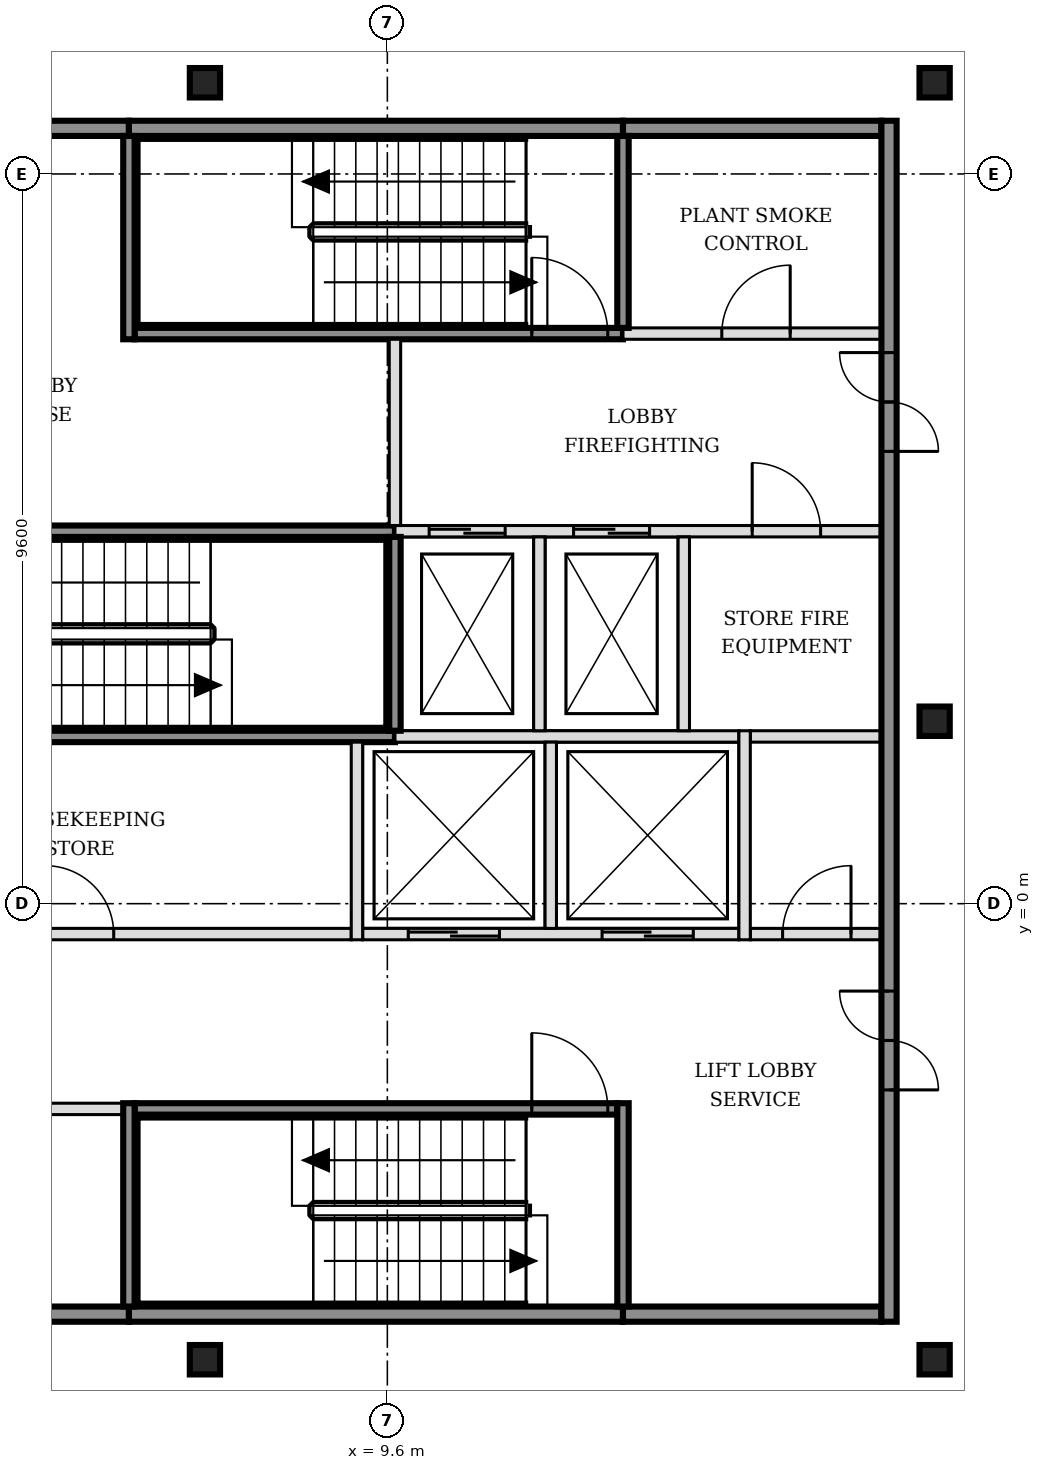
"""IFC4 building model, lengths in metres.
Left out: names, types, materials, properties, quantities, classifications, styles, units other than length and angle.
Written with IfcOpenShell. Run it as: python <this file> out.ifc"""

import sys

from ifc_helpers import new_model, si_unit, direction, frame, frame_2d, origin, origin_2d, place, context, subcontext, project, spatial, rectangle, i_section, extrude, element, fill, save


model = new_model("IFC4")
c1 = context("Model", 3, precision=1e-05, world=origin(), true_north=direction((0.0, 1.0)))
c2 = subcontext(c1, "Body", "Model", "MODEL_VIEW")
j1 = project(units=[si_unit("LENGTHUNIT", "METRE"), si_unit("PLANEANGLEUNIT", "RADIAN")], contexts=[c1])
p1 = place(None, origin())
s1 = spatial("IfcSite", under=j1, at=p1, CompositionType="ELEMENT")
p2 = place(p1, origin())
s2 = spatial("IfcBuilding", under=s1, at=p2, CompositionType="ELEMENT")
p3 = place(p2, frame((0.0, 0.0, 288.6)))
s3 = spatial("IfcBuildingStorey", under=s2, at=p3, CompositionType="ELEMENT", Elevation=288.6)
for number, where, z_axis, x_axis in (
    (1, (7.2, -6.0, -0.15), (0.0, 0.0, 1.0), (1.0, 0.0, 0.0)),
    (2, (16.8, -6.0, -0.15), (0.0, 0.0, 1.0), (1.0, 0.0, 0.0)),
    (3, (16.8, 2.4, -0.15), (0.0, 0.0, 1.0), (1.0, 0.0, 0.0)),
    (4, (7.2, 10.8, -0.15), (0.0, 0.0, 1.0), (1.0, 0.0, 0.0)),
    (5, (16.8, 10.8, -0.15), (0.0, 0.0, 1.0), (1.0, 0.0, 0.0)),
):
    element("IfcColumn", number, at=place(p3, frame(where, z_axis=z_axis, x_axis=x_axis)), inside=s3, PredefinedType="COLUMN", context=c2, shape_type="SweptSolid", body=[
        extrude(i_section(OverallWidth=0.398, OverallDepth=0.387, WebThickness=0.021, FlangeThickness=0.033, FilletRadius=0.015, at=origin_2d()), origin(), (0.0, 0.0, 1.0), 3.6),
    ])
p4 = place(p3, frame((-1.7, -5.4, 0.0), z_axis=(0.0, 0.0, 1.0), x_axis=(1.0, 0.0, 0.0)))
e6 = element("IfcWall", 6, at=p4, inside=s3, PredefinedType="SOLIDWALL", context=c2, shape_type="SweptSolid", body=[
    extrude(rectangle(XDim=7.9, YDim=0.2, at=frame_2d((3.95, 0.0))), origin(), (0.0, 0.0, 1.0), 3.45),
])
p5 = place(p3, frame((6.2, -5.4, 0.0), z_axis=(0.0, 0.0, 1.0), x_axis=(1.0, 0.0, 0.0)))
e7 = element("IfcWall", 7, at=p5, inside=s3, PredefinedType="SOLIDWALL", context=c2, shape_type="SweptSolid", body=[
    extrude(rectangle(XDim=6.5, YDim=0.2, at=frame_2d((3.25, 0.0))), origin(), (0.0, 0.0, 1.0), 3.45),
])
p6 = place(p3, frame((12.7, -5.4, 0.0), z_axis=(0.0, 0.0, 1.0), x_axis=(1.0, 0.0, 0.0)))
e8 = element("IfcWall", 8, at=p6, inside=s3, PredefinedType="SOLIDWALL", context=c2, shape_type="SweptSolid", body=[
    extrude(rectangle(XDim=3.4, YDim=0.2, at=frame_2d((1.7, 0.0))), origin(), (0.0, 0.0, 1.0), 3.45),
])
p7 = place(p3, frame((-1.7, -2.7, 0.0), z_axis=(0.0, 0.0, 1.0), x_axis=(1.0, 0.0, 0.0)))
e9 = element("IfcWall", 9, at=p7, inside=s3, PredefinedType="PARTITIONING", context=c2, shape_type="SweptSolid", body=[
    extrude(rectangle(XDim=7.825, YDim=0.15, at=frame_2d((3.913, 0.0))), origin(), (0.0, 0.0, 1.0), 3.45),
])
p8 = place(p7, frame((3.45, 0.0, 0.0)))
e10 = element("IfcOpeningElement", 10, at=p8, cuts=e9, PredefinedType="OPENING", context=c2, shape_type="SweptSolid", body=[
    extrude(rectangle(XDim=0.9, YDim=2.1, at=frame_2d((0.45, 1.05))), frame((0.0, 0.085, 0.0), z_axis=(0.0, -1.0, 0.0), x_axis=(1.0, 0.0, 0.0)), (0.0, 0.0, 1.0), 0.17),
])
p9 = place(p3, frame((6.275, -2.7, 0.0), z_axis=(0.0, 0.0, 1.0), x_axis=(1.0, 0.0, 0.0)))
e11 = element("IfcWall", 11, at=p9, inside=s3, PredefinedType="SOLIDWALL", context=c2, shape_type="SweptSolid", body=[
    extrude(rectangle(XDim=6.35, YDim=0.15, at=frame_2d((3.175, 0.0))), origin(), (0.0, 0.0, 1.0), 3.45),
])
p10 = place(p9, frame((5.225, 0.0, 0.0)))
e12 = element("IfcOpeningElement", 12, at=p10, cuts=e11, PredefinedType="OPENING", context=c2, shape_type="SweptSolid", body=[
    extrude(rectangle(XDim=1.0, YDim=2.1, at=frame_2d((0.5, 1.05))), frame((0.0, 0.085, 0.0), z_axis=(0.0, -1.0, 0.0), x_axis=(1.0, 0.0, 0.0)), (0.0, 0.0, 1.0), 0.17),
])
p11 = place(p3, frame((-1.7, -0.4, 0.0), z_axis=(0.0, 0.0, 1.0), x_axis=(1.0, 0.0, 0.0)))
e13 = element("IfcWall", 13, at=p11, inside=s3, PredefinedType="PARTITIONING", context=c2, shape_type="SweptSolid", body=[
    extrude(rectangle(XDim=10.825, YDim=0.15, at=frame_2d((5.413, 0.0))), origin(), (0.0, 0.0, 1.0), 3.45),
])
p12 = place(p11, frame((1.3, 0.0, 0.0)))
e14 = element("IfcOpeningElement", 14, at=p12, cuts=e13, PredefinedType="OPENING", context=c2, shape_type="SweptSolid", body=[
    extrude(rectangle(XDim=0.9, YDim=2.1, at=frame_2d((0.45, 1.05))), frame((0.0, 0.085, 0.0), z_axis=(0.0, -1.0, 0.0), x_axis=(1.0, 0.0, 0.0)), (0.0, 0.0, 1.0), 0.17),
])
p13 = place(p11, frame((6.8, 0.0, 0.0)))
e15 = element("IfcOpeningElement", 15, at=p13, cuts=e13, PredefinedType="OPENING", context=c2, shape_type="SweptSolid", body=[
    extrude(rectangle(XDim=0.9, YDim=2.1, at=frame_2d((0.45, 1.05))), frame((0.0, 0.085, 0.0), z_axis=(0.0, -1.0, 0.0), x_axis=(1.0, 0.0, 0.0)), (0.0, 0.0, 1.0), 0.17),
])
p14 = place(p3, frame((9.275, -0.4, 0.0), z_axis=(0.0, 0.0, 1.0), x_axis=(1.0, 0.0, 0.0)))
e16 = element("IfcWall", 16, at=p14, inside=s3, PredefinedType="SOLIDWALL", context=c2, shape_type="SweptSolid", body=[
    extrude(rectangle(XDim=4.95, YDim=0.15, at=frame_2d((2.475, 0.0))), origin(), (0.0, 0.0, 1.0), 3.45),
])
p15 = place(p14, frame((0.6, 0.0, 0.0)))
e17 = element("IfcOpeningElement", 17, at=p15, cuts=e16, PredefinedType="OPENING", context=c2, shape_type="SweptSolid", body=[
    extrude(rectangle(XDim=1.2, YDim=2.1, at=frame_2d((0.6, 1.05))), frame((0.0, 0.085, 0.0), z_axis=(0.0, -1.0, 0.0), x_axis=(1.0, 0.0, 0.0)), (0.0, 0.0, 1.0), 0.17),
])
p16 = place(p14, frame((3.15, 0.0, 0.0)))
e18 = element("IfcOpeningElement", 18, at=p16, cuts=e16, PredefinedType="OPENING", context=c2, shape_type="SweptSolid", body=[
    extrude(rectangle(XDim=1.2, YDim=2.1, at=frame_2d((0.6, 1.05))), frame((0.0, 0.085, 0.0), z_axis=(0.0, -1.0, 0.0), x_axis=(1.0, 0.0, 0.0)), (0.0, 0.0, 1.0), 0.17),
])
p17 = place(p3, frame((14.375, -0.4, 0.0), z_axis=(0.0, 0.0, 1.0), x_axis=(1.0, 0.0, 0.0)))
e19 = element("IfcWall", 19, at=p17, inside=s3, PredefinedType="PARTITIONING", context=c2, shape_type="SweptSolid", body=[
    extrude(rectangle(XDim=1.725, YDim=0.15, at=frame_2d((0.863, 0.0))), origin(), (0.0, 0.0, 1.0), 3.45),
])
p18 = place(p17, frame((0.425, 0.0, 0.0)))
e20 = element("IfcOpeningElement", 20, at=p18, cuts=e19, PredefinedType="OPENING", context=c2, shape_type="SweptSolid", body=[
    extrude(rectangle(XDim=0.9, YDim=2.1, at=frame_2d((0.45, 1.05))), frame((0.0, 0.085, 0.0), z_axis=(0.0, -1.0, 0.0), x_axis=(1.0, 0.0, 0.0)), (0.0, 0.0, 1.0), 0.17),
])
p19 = place(p3, frame((3.2, 2.2, 0.0), z_axis=(0.0, 0.0, 1.0), x_axis=(1.0, 0.0, 0.0)))
e21 = element("IfcWall", 21, at=p19, inside=s3, PredefinedType="SOLIDWALL", context=c2, shape_type="SweptSolid", body=[
    extrude(rectangle(XDim=6.5, YDim=0.15, at=frame_2d((3.25, 0.0))), origin(), (0.0, 0.0, 1.0), 3.45),
])
p20 = place(p3, frame((9.7, 2.2, 0.0), z_axis=(0.0, 0.0, 1.0), x_axis=(1.0, 0.0, 0.0)))
e22 = element("IfcWall", 22, at=p20, inside=s3, PredefinedType="SOLIDWALL", context=c2, shape_type="SweptSolid", body=[
    extrude(rectangle(XDim=4.525, YDim=0.15, at=frame_2d((2.263, 0.0))), origin(), (0.0, 0.0, 1.0), 3.45),
])
p21 = place(p3, frame((14.375, 2.2, 0.0), z_axis=(0.0, 0.0, 1.0), x_axis=(1.0, 0.0, 0.0)))
e23 = element("IfcWall", 23, at=p21, inside=s3, PredefinedType="PARTITIONING", context=c2, shape_type="SweptSolid", body=[
    extrude(rectangle(XDim=1.725, YDim=0.15, at=frame_2d((0.863, 0.0))), origin(), (0.0, 0.0, 1.0), 3.45),
])
p22 = place(p3, frame((3.2, 4.9, 0.0), z_axis=(0.0, 0.0, 1.0), x_axis=(1.0, 0.0, 0.0)))
e24 = element("IfcWall", 24, at=p22, inside=s3, PredefinedType="SOLIDWALL", context=c2, shape_type="SweptSolid", body=[
    extrude(rectangle(XDim=6.5, YDim=0.15, at=frame_2d((3.25, 0.0))), origin(), (0.0, 0.0, 1.0), 3.45),
])
p23 = place(p22, frame((0.175, 0.0, 0.0)))
e25 = element("IfcOpeningElement", 25, at=p23, cuts=e24, PredefinedType="OPENING", context=c2, shape_type="SweptSolid", body=[
    extrude(rectangle(XDim=1.0, YDim=2.1, at=frame_2d((0.5, 1.05))), frame((0.0, 0.085, 0.0), z_axis=(0.0, -1.0, 0.0), x_axis=(1.0, 0.0, 0.0)), (0.0, 0.0, 1.0), 0.17),
])
p24 = place(p3, frame((9.7, 4.9, 0.0), z_axis=(0.0, 0.0, 1.0), x_axis=(1.0, 0.0, 0.0)))
e26 = element("IfcWall", 26, at=p24, inside=s3, PredefinedType="SOLIDWALL", context=c2, shape_type="SweptSolid", body=[
    extrude(rectangle(XDim=6.4, YDim=0.15, at=frame_2d((3.2, 0.0))), origin(), (0.0, 0.0, 1.0), 3.45),
])
p25 = place(p24, frame((0.45, 0.0, 0.0)))
e27 = element("IfcOpeningElement", 27, at=p25, cuts=e26, PredefinedType="OPENING", context=c2, shape_type="SweptSolid", body=[
    extrude(rectangle(XDim=1.0, YDim=2.1, at=frame_2d((0.5, 1.05))), frame((0.0, 0.085, 0.0), z_axis=(0.0, -1.0, 0.0), x_axis=(1.0, 0.0, 0.0)), (0.0, 0.0, 1.0), 0.17),
])
p26 = place(p24, frame((2.35, 0.0, 0.0)))
e28 = element("IfcOpeningElement", 28, at=p26, cuts=e26, PredefinedType="OPENING", context=c2, shape_type="SweptSolid", body=[
    extrude(rectangle(XDim=1.0, YDim=2.1, at=frame_2d((0.5, 1.05))), frame((0.0, 0.085, 0.0), z_axis=(0.0, -1.0, 0.0), x_axis=(1.0, 0.0, 0.0)), (0.0, 0.0, 1.0), 0.17),
])
p27 = place(p24, frame((4.7, 0.0, 0.0)))
e29 = element("IfcOpeningElement", 29, at=p27, cuts=e26, PredefinedType="OPENING", context=c2, shape_type="SweptSolid", body=[
    extrude(rectangle(XDim=0.9, YDim=2.1, at=frame_2d((0.45, 1.05))), frame((0.0, 0.085, 0.0), z_axis=(0.0, -1.0, 0.0), x_axis=(1.0, 0.0, 0.0)), (0.0, 0.0, 1.0), 0.17),
])
p28 = place(p3, frame((6.275, 7.5, 0.0), z_axis=(0.0, 0.0, 1.0), x_axis=(1.0, 0.0, 0.0)))
e30 = element("IfcWall", 30, at=p28, inside=s3, PredefinedType="SOLIDWALL", context=c2, shape_type="SweptSolid", body=[
    extrude(rectangle(XDim=6.425, YDim=0.15, at=frame_2d((3.212, 0.0))), origin(), (0.0, 0.0, 1.0), 3.45),
])
p29 = place(p28, frame((5.225, 0.0, 0.0)))
e31 = element("IfcOpeningElement", 31, at=p29, cuts=e30, PredefinedType="OPENING", context=c2, shape_type="SweptSolid", body=[
    extrude(rectangle(XDim=1.0, YDim=2.1, at=frame_2d((0.5, 1.05))), frame((0.0, 0.085, 0.0), z_axis=(0.0, -1.0, 0.0), x_axis=(1.0, 0.0, 0.0)), (0.0, 0.0, 1.0), 0.17),
])
p30 = place(p3, frame((12.7, 7.5, 0.0), z_axis=(0.0, 0.0, 1.0), x_axis=(1.0, 0.0, 0.0)))
e32 = element("IfcWall", 32, at=p30, inside=s3, PredefinedType="SOLIDWALL", context=c2, shape_type="SweptSolid", body=[
    extrude(rectangle(XDim=3.4, YDim=0.15, at=frame_2d((1.7, 0.0))), origin(), (0.0, 0.0, 1.0), 3.45),
])
p31 = place(p30, frame((1.3, 0.0, 0.0)))
e33 = element("IfcOpeningElement", 33, at=p31, cuts=e32, PredefinedType="OPENING", context=c2, shape_type="SweptSolid", body=[
    extrude(rectangle(XDim=0.9, YDim=2.1, at=frame_2d((0.45, 1.05))), frame((0.0, 0.085, 0.0), z_axis=(0.0, -1.0, 0.0), x_axis=(1.0, 0.0, 0.0)), (0.0, 0.0, 1.0), 0.17),
])
p32 = place(p3, frame((-1.7, 10.2, 0.0), z_axis=(0.0, 0.0, 1.0), x_axis=(1.0, 0.0, 0.0)))
e34 = element("IfcWall", 34, at=p32, inside=s3, PredefinedType="SOLIDWALL", context=c2, shape_type="SweptSolid", body=[
    extrude(rectangle(XDim=7.9, YDim=0.2, at=frame_2d((3.95, 0.0))), origin(), (0.0, 0.0, 1.0), 3.45),
])
p33 = place(p3, frame((6.2, 10.2, 0.0), z_axis=(0.0, 0.0, 1.0), x_axis=(1.0, 0.0, 0.0)))
e35 = element("IfcWall", 35, at=p33, inside=s3, PredefinedType="SOLIDWALL", context=c2, shape_type="SweptSolid", body=[
    extrude(rectangle(XDim=6.5, YDim=0.2, at=frame_2d((3.25, 0.0))), origin(), (0.0, 0.0, 1.0), 3.45),
])
p34 = place(p3, frame((12.7, 10.2, 0.0), z_axis=(0.0, 0.0, 1.0), x_axis=(1.0, 0.0, 0.0)))
e36 = element("IfcWall", 36, at=p34, inside=s3, PredefinedType="SOLIDWALL", context=c2, shape_type="SweptSolid", body=[
    extrude(rectangle(XDim=3.4, YDim=0.2, at=frame_2d((1.7, 0.0))), origin(), (0.0, 0.0, 1.0), 3.45),
])
for number, where, z_axis, x_axis in (
    (37, (6.2, -5.3, 0.0), (0.0, 0.0, 1.0), (0.0, 1.0, 0.0)),
    (38, (6.2, 7.425, 0.0), (0.0, 0.0, 1.0), (0.0, 1.0, 0.0)),
):
    element("IfcWall", number, at=place(p3, frame(where, z_axis=z_axis, x_axis=x_axis)), inside=s3, PredefinedType="SOLIDWALL", context=c2, shape_type="SweptSolid", body=[
        extrude(rectangle(XDim=2.675, YDim=0.15, at=frame_2d((1.337, 0.0))), origin(), (0.0, 0.0, 1.0), 3.45),
    ])
p35 = place(p3, frame((9.2, -0.475, 0.0), z_axis=(0.0, 0.0, 1.0), x_axis=(0.0, 1.0, 0.0)))
e39 = element("IfcWall", 39, at=p35, inside=s3, PredefinedType="SOLIDWALL", context=c2, shape_type="SweptSolid", body=[
    extrude(rectangle(XDim=2.6, YDim=0.15, at=frame_2d((1.3, 0.0))), origin(), (0.0, 0.0, 1.0), 3.45),
])
p36 = place(p3, frame((9.7, 2.275, 0.0), z_axis=(0.0, 0.0, 1.0), x_axis=(0.0, 1.0, 0.0)))
e40 = element("IfcWall", 40, at=p36, inside=s3, PredefinedType="SOLIDWALL", context=c2, shape_type="SweptSolid", body=[
    extrude(rectangle(XDim=2.55, YDim=0.15, at=frame_2d((1.275, 0.0))), origin(), (0.0, 0.0, 1.0), 3.45),
])
p37 = place(p3, frame((9.7, 4.975, 0.0), z_axis=(0.0, 0.0, 1.0), x_axis=(0.0, 1.0, 0.0)))
e41 = element("IfcWall", 41, at=p37, inside=s3, PredefinedType="SOLIDWALL", context=c2, shape_type="SweptSolid", body=[
    extrude(rectangle(XDim=2.45, YDim=0.15, at=frame_2d((1.225, 0.0))), origin(), (0.0, 0.0, 1.0), 3.45),
])
p38 = place(p3, frame((11.6, 2.275, 0.0), z_axis=(0.0, 0.0, 1.0), x_axis=(0.0, 1.0, 0.0)))
e42 = element("IfcWall", 42, at=p38, inside=s3, PredefinedType="SOLIDWALL", context=c2, shape_type="SweptSolid", body=[
    extrude(rectangle(XDim=2.55, YDim=0.15, at=frame_2d((1.275, 0.0))), origin(), (0.0, 0.0, 1.0), 3.45),
])
p39 = place(p3, frame((11.75, -0.325, 0.0), z_axis=(0.0, 0.0, 1.0), x_axis=(0.0, 1.0, 0.0)))
e43 = element("IfcWall", 43, at=p39, inside=s3, PredefinedType="SOLIDWALL", context=c2, shape_type="SweptSolid", body=[
    extrude(rectangle(XDim=2.45, YDim=0.15, at=frame_2d((1.225, 0.0))), origin(), (0.0, 0.0, 1.0), 3.45),
])
p40 = place(p3, frame((12.7, -5.3, 0.0), z_axis=(0.0, 0.0, 1.0), x_axis=(0.0, 1.0, 0.0)))
e44 = element("IfcWall", 44, at=p40, inside=s3, PredefinedType="SOLIDWALL", context=c2, shape_type="SweptSolid", body=[
    extrude(rectangle(XDim=2.675, YDim=0.15, at=frame_2d((1.337, 0.0))), origin(), (0.0, 0.0, 1.0), 3.45),
])
p41 = place(p3, frame((12.7, 7.575, 0.0), z_axis=(0.0, 0.0, 1.0), x_axis=(0.0, 1.0, 0.0)))
e45 = element("IfcWall", 45, at=p41, inside=s3, PredefinedType="SOLIDWALL", context=c2, shape_type="SweptSolid", body=[
    extrude(rectangle(XDim=2.525, YDim=0.15, at=frame_2d((1.263, 0.0))), origin(), (0.0, 0.0, 1.0), 3.45),
])
p42 = place(p3, frame((13.5, 2.275, 0.0), z_axis=(0.0, 0.0, 1.0), x_axis=(0.0, 1.0, 0.0)))
e46 = element("IfcWall", 46, at=p42, inside=s3, PredefinedType="SOLIDWALL", context=c2, shape_type="SweptSolid", body=[
    extrude(rectangle(XDim=2.55, YDim=0.15, at=frame_2d((1.275, 0.0))), origin(), (0.0, 0.0, 1.0), 3.45),
])
p43 = place(p3, frame((14.3, -0.475, 0.0), z_axis=(0.0, 0.0, 1.0), x_axis=(0.0, 1.0, 0.0)))
e47 = element("IfcWall", 47, at=p43, inside=s3, PredefinedType="SOLIDWALL", context=c2, shape_type="SweptSolid", body=[
    extrude(rectangle(XDim=2.75, YDim=0.15, at=frame_2d((1.375, 0.0))), origin(), (0.0, 0.0, 1.0), 3.45),
])
p44 = place(p3, frame((16.2, -5.5, 0.0), z_axis=(0.0, 0.0, 1.0), x_axis=(0.0, 1.0, 0.0)))
e48 = element("IfcWall", 48, at=p44, inside=s3, PredefinedType="SOLIDWALL", context=c2, shape_type="SweptSolid", body=[
    extrude(rectangle(XDim=15.8, YDim=0.2, at=frame_2d((7.9, 0.0))), origin(), (0.0, 0.0, 1.0), 3.45),
])
p45 = place(p44, frame((3.05, 0.0, 0.0)))
e49 = element("IfcOpeningElement", 49, at=p45, cuts=e48, PredefinedType="OPENING", context=c2, shape_type="SweptSolid", body=[
    extrude(rectangle(XDim=1.3, YDim=2.1, at=frame_2d((0.65, 1.05))), frame((0.0, 0.11, 0.0), z_axis=(0.0, -1.0, 0.0), x_axis=(1.0, 0.0, 0.0)), (0.0, 0.0, 1.0), 0.22),
])
p46 = place(p44, frame((11.45, 0.0, 0.0)))
e50 = element("IfcOpeningElement", 50, at=p46, cuts=e48, PredefinedType="OPENING", context=c2, shape_type="SweptSolid", body=[
    extrude(rectangle(XDim=1.3, YDim=2.1, at=frame_2d((0.65, 1.05))), frame((0.0, 0.11, 0.0), z_axis=(0.0, -1.0, 0.0), x_axis=(1.0, 0.0, 0.0)), (0.0, 0.0, 1.0), 0.22),
])
p47 = place(p15, origin())
e51 = element("IfcDoor", 51, at=p47, inside=s3, OperationType="DOUBLE_DOOR_SLIDING", PredefinedType="DOOR", context=c2, shape_type="SweptSolid", body=[
    extrude(rectangle(XDim=1.2, YDim=2.1, at=frame_2d((0.6, 1.05))), frame((0.0, 0.025, 0.0), z_axis=(0.0, -1.0, 0.0), x_axis=(1.0, 0.0, 0.0)), (0.0, 0.0, 1.0), 0.05),
])
fill(e17, e51)
p48 = place(p16, origin())
e52 = element("IfcDoor", 52, at=p48, inside=s3, OperationType="DOUBLE_DOOR_SLIDING", PredefinedType="DOOR", context=c2, shape_type="SweptSolid", body=[
    extrude(rectangle(XDim=1.2, YDim=2.1, at=frame_2d((0.6, 1.05))), frame((0.0, 0.025, 0.0), z_axis=(0.0, -1.0, 0.0), x_axis=(1.0, 0.0, 0.0)), (0.0, 0.0, 1.0), 0.05),
])
fill(e18, e52)
p49 = place(p25, origin())
e53 = element("IfcDoor", 53, at=p49, inside=s3, OperationType="DOUBLE_DOOR_SLIDING", PredefinedType="DOOR", context=c2, shape_type="SweptSolid", body=[
    extrude(rectangle(XDim=1.0, YDim=2.1, at=frame_2d((0.5, 1.05))), frame((0.0, 0.025, 0.0), z_axis=(0.0, -1.0, 0.0), x_axis=(1.0, 0.0, 0.0)), (0.0, 0.0, 1.0), 0.05),
])
fill(e27, e53)
p50 = place(p26, origin())
e54 = element("IfcDoor", 54, at=p50, inside=s3, OperationType="DOUBLE_DOOR_SLIDING", PredefinedType="DOOR", context=c2, shape_type="SweptSolid", body=[
    extrude(rectangle(XDim=1.0, YDim=2.1, at=frame_2d((0.5, 1.05))), frame((0.0, 0.025, 0.0), z_axis=(0.0, -1.0, 0.0), x_axis=(1.0, 0.0, 0.0)), (0.0, 0.0, 1.0), 0.05),
])
fill(e28, e54)
p51 = place(p10, origin())
e55 = element("IfcDoor", 55, at=p51, inside=s3, OperationType="SINGLE_SWING_LEFT", PredefinedType="DOOR", context=c2, shape_type="SweptSolid", body=[
    extrude(rectangle(XDim=1.0, YDim=2.1, at=frame_2d((0.5, 1.05))), frame((0.0, 0.025, 0.0), z_axis=(0.0, -1.0, 0.0), x_axis=(1.0, 0.0, 0.0)), (0.0, 0.0, 1.0), 0.05),
])
fill(e12, e55)
p52 = place(p29, origin())
e56 = element("IfcDoor", 56, at=p52, inside=s3, OperationType="SINGLE_SWING_LEFT", PredefinedType="DOOR", context=c2, shape_type="SweptSolid", body=[
    extrude(rectangle(XDim=1.0, YDim=2.1, at=frame_2d((0.5, 1.05))), frame((0.0, 0.025, 0.0), z_axis=(0.0, -1.0, 0.0), x_axis=(1.0, 0.0, 0.0)), (0.0, 0.0, 1.0), 0.05),
])
fill(e31, e56)
p53 = place(p45, origin())
e57 = element("IfcDoor", 57, at=p53, inside=s3, OperationType="DOUBLE_DOOR_SINGLE_SWING", PredefinedType="DOOR", context=c2, shape_type="SweptSolid", body=[
    extrude(rectangle(XDim=1.3, YDim=2.1, at=frame_2d((0.65, 1.05))), frame((0.0, 0.025, 0.0), z_axis=(0.0, -1.0, 0.0), x_axis=(1.0, 0.0, 0.0)), (0.0, 0.0, 1.0), 0.05),
])
fill(e49, e57)
p54 = place(p46, origin())
e58 = element("IfcDoor", 58, at=p54, inside=s3, OperationType="DOUBLE_DOOR_SINGLE_SWING", PredefinedType="DOOR", context=c2, shape_type="SweptSolid", body=[
    extrude(rectangle(XDim=1.3, YDim=2.1, at=frame_2d((0.65, 1.05))), frame((0.0, 0.025, 0.0), z_axis=(0.0, -1.0, 0.0), x_axis=(1.0, 0.0, 0.0)), (0.0, 0.0, 1.0), 0.05),
])
fill(e50, e58)
p55 = place(p18, origin())
e59 = element("IfcDoor", 59, at=p55, inside=s3, OperationType="SINGLE_SWING_RIGHT", PredefinedType="DOOR", context=c2, shape_type="SweptSolid", body=[
    extrude(rectangle(XDim=0.9, YDim=2.1, at=frame_2d((0.45, 1.05))), frame((0.0, 0.025, 0.0), z_axis=(0.0, -1.0, 0.0), x_axis=(1.0, 0.0, 0.0)), (0.0, 0.0, 1.0), 0.05),
])
fill(e20, e59)
p56 = place(p27, origin())
e60 = element("IfcDoor", 60, at=p56, inside=s3, OperationType="SINGLE_SWING_LEFT", PredefinedType="DOOR", context=c2, shape_type="SweptSolid", body=[
    extrude(rectangle(XDim=0.9, YDim=2.1, at=frame_2d((0.45, 1.05))), frame((0.0, 0.025, 0.0), z_axis=(0.0, -1.0, 0.0), x_axis=(1.0, 0.0, 0.0)), (0.0, 0.0, 1.0), 0.05),
])
fill(e29, e60)
p57 = place(p31, origin())
e61 = element("IfcDoor", 61, at=p57, inside=s3, OperationType="SINGLE_SWING_RIGHT", PredefinedType="DOOR", context=c2, shape_type="SweptSolid", body=[
    extrude(rectangle(XDim=0.9, YDim=2.1, at=frame_2d((0.45, 1.05))), frame((0.0, 0.025, 0.0), z_axis=(0.0, -1.0, 0.0), x_axis=(1.0, 0.0, 0.0)), (0.0, 0.0, 1.0), 0.05),
])
fill(e33, e61)
p58 = place(p13, origin())
e62 = element("IfcDoor", 62, at=p58, inside=s3, OperationType="SINGLE_SWING_LEFT", PredefinedType="DOOR", context=c2, shape_type="SweptSolid", body=[
    extrude(rectangle(XDim=0.9, YDim=2.1, at=frame_2d((0.45, 1.05))), frame((0.0, 0.025, 0.0), z_axis=(0.0, -1.0, 0.0), x_axis=(1.0, 0.0, 0.0)), (0.0, 0.0, 1.0), 0.05),
])
fill(e15, e62)
save(model, sys.argv[1])
